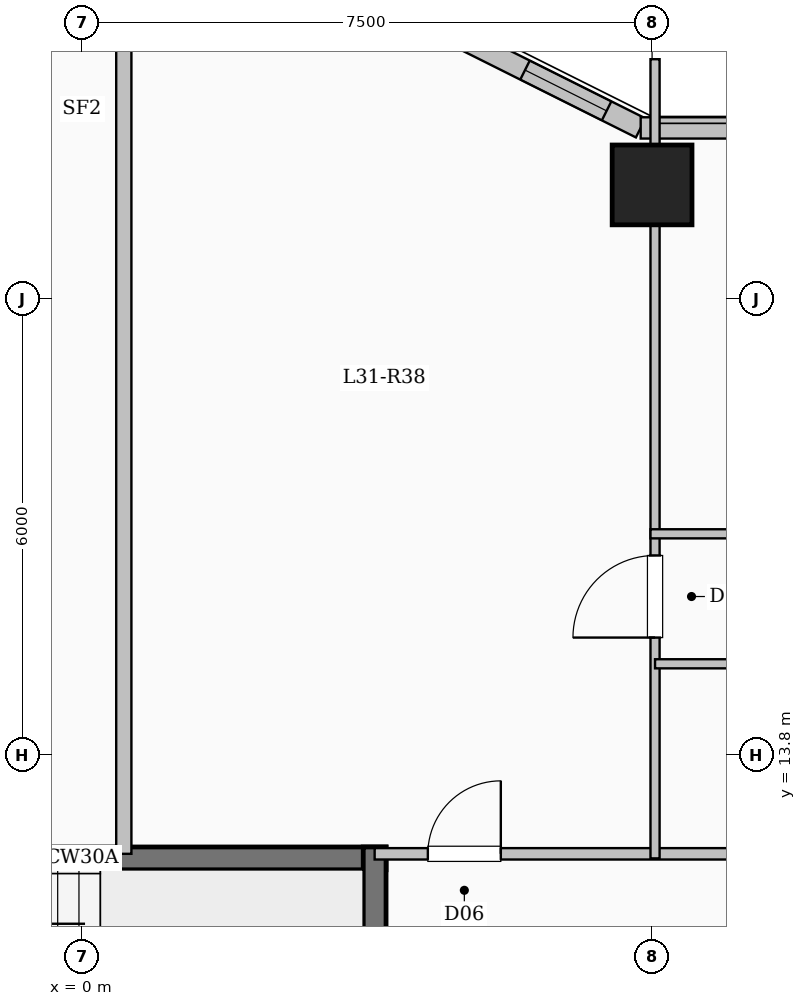
"""IFC4 building model, lengths in metres.
Left out: names, types, materials, properties, quantities, classifications, styles, units other than length and angle.
Written with IfcOpenShell. Run it as: python <this file> out.ifc"""

import sys

from ifc_helpers import new_model, si_unit, direction, frame, frame_2d, origin, origin_2d, place, context, subcontext, project, spatial, rectangle, extrude, element, fill, save


model = new_model("IFC4")
c1 = context("Model", 3, precision=1e-05, world=origin(), true_north=direction((0.0, 1.0)))
c2 = subcontext(c1, "Body", "Model", "MODEL_VIEW")
j1 = project(units=[si_unit("LENGTHUNIT", "METRE"), si_unit("PLANEANGLEUNIT", "RADIAN")], contexts=[c1])
p1 = place(None, origin())
s1 = spatial("IfcSite", under=j1, at=p1, CompositionType="ELEMENT")
p2 = place(p1, origin())
s2 = spatial("IfcBuilding", under=s1, at=p2, CompositionType="ELEMENT")
p3 = place(p2, frame((0.0, 0.0, 115.15)))
s3 = spatial("IfcBuildingStorey", under=s2, at=p3, CompositionType="ELEMENT", Elevation=115.15)
p4 = place(p3, frame((7.5, 21.3, 0.0), z_axis=(0.0, 0.0, 1.0), x_axis=(1.0, 0.0, 0.0)))
e1 = element("IfcColumn", 1, at=p4, inside=s3, PredefinedType="COLUMN", context=c2, shape_type="SweptSolid", body=[
    extrude(rectangle(XDim=1.05, YDim=1.05, at=origin_2d()), origin(), (0.0, 0.0, 1.0), 3.35),
])
p5 = place(p3, frame((4.35, 23.55, 0.0), z_axis=(0.0, 0.0, 1.0), x_axis=(0.894427191, -0.4472135955, 0.0)))
e2 = element("IfcWall", 2, at=p5, inside=s3, PredefinedType="SOLIDWALL", context=c2, shape_type="SweptSolid", body=[
    extrude(rectangle(XDim=3.354, YDim=0.28, at=frame_2d((1.677, 0.0))), origin(), (0.0, 0.0, 1.0), 3.05),
])
p6 = place(p5, frame((1.653, 0.0, 0.95)))
e3 = element("IfcOpeningElement", 3, at=p6, cuts=e2, PredefinedType="OPENING", context=c2, shape_type="SweptSolid", body=[
    extrude(rectangle(XDim=1.2, YDim=1.5, at=frame_2d((0.6, 0.75))), frame((0.0, 0.15, 0.0), z_axis=(0.0, -1.0, 0.0), x_axis=(1.0, 0.0, 0.0)), (0.0, 0.0, 1.0), 0.3),
])
p7 = place(p3, frame((7.35, 22.05, 0.0), z_axis=(0.0, 0.0, 1.0), x_axis=(1.0, 0.0, 0.0)))
e4 = element("IfcWall", 4, at=p7, inside=s3, PredefinedType="SOLIDWALL", context=c2, shape_type="SweptSolid", body=[
    extrude(rectangle(XDim=13.8, YDim=0.28, at=frame_2d((6.9, 0.0))), origin(), (0.0, 0.0, 1.0), 3.05),
])
p8 = place(p7, frame((1.534, 0.0, 0.9)))
e5 = element("IfcOpeningElement", 5, at=p8, cuts=e4, PredefinedType="OPENING", context=c2, shape_type="SweptSolid", body=[
    extrude(rectangle(XDim=1.8, YDim=1.65, at=frame_2d((0.9, 0.825))), frame((0.0, 0.15, 0.0), z_axis=(0.0, -1.0, 0.0), x_axis=(1.0, 0.0, 0.0)), (0.0, 0.0, 1.0), 0.3),
])
p9 = place(p7, frame((6.025, 0.0, 0.9)))
e6 = element("IfcOpeningElement", 6, at=p9, cuts=e4, PredefinedType="OPENING", context=c2, shape_type="SweptSolid", body=[
    extrude(rectangle(XDim=1.8, YDim=1.65, at=frame_2d((0.9, 0.825))), frame((0.0, 0.15, 0.0), z_axis=(0.0, -1.0, 0.0), x_axis=(1.0, 0.0, 0.0)), (0.0, 0.0, 1.0), 0.3),
])
p10 = place(p7, frame((10.542, 0.0, 0.9)))
e7 = element("IfcOpeningElement", 7, at=p10, cuts=e4, PredefinedType="OPENING", context=c2, shape_type="SweptSolid", body=[
    extrude(rectangle(XDim=1.8, YDim=1.65, at=frame_2d((0.9, 0.825))), frame((0.0, 0.15, 0.0), z_axis=(0.0, -1.0, 0.0), x_axis=(1.0, 0.0, 0.0)), (0.0, 0.0, 1.0), 0.3),
])
p11 = place(p3, frame((-4.0, 12.44, 0.0), z_axis=(0.0, 0.0, 1.0), x_axis=(1.0, 0.0, 0.0)))
e8 = element("IfcWall", 8, at=p11, inside=s3, PredefinedType="SHEAR", context=c2, shape_type="SweptSolid", body=[
    extrude(rectangle(XDim=8.0, YDim=0.3, at=frame_2d((4.0, 0.0))), origin(), (0.0, 0.0, 1.0), 3.35),
])
p12 = place(p3, frame((3.85, 9.0, 0.0), z_axis=(0.0, 0.0, 1.0), x_axis=(0.0, 1.0, 0.0)))
e9 = element("IfcWall", 9, at=p12, inside=s3, PredefinedType="SHEAR", context=c2, shape_type="SweptSolid", body=[
    extrude(rectangle(XDim=3.59, YDim=0.3, at=frame_2d((1.795, 0.0))), origin(), (0.0, 0.0, 1.0), 3.35),
])
p13 = place(p3, frame((3.85, 12.5, 0.0), z_axis=(0.0, 0.0, 1.0), x_axis=(1.0, 0.0, 0.0)))
e10 = element("IfcWall", 10, at=p13, inside=s3, PredefinedType="PARTITIONING", context=c2, shape_type="SweptSolid", body=[
    extrude(rectangle(XDim=17.2, YDim=0.15, at=frame_2d((8.6, 0.0))), origin(), (0.0, 0.0, 1.0), 3.05),
])
p14 = place(p13, frame((0.7, 0.0, 0.0)))
e11 = element("IfcOpeningElement", 11, at=p14, cuts=e10, PredefinedType="OPENING", context=c2, shape_type="SweptSolid", body=[
    extrude(rectangle(XDim=0.96, YDim=2.15, at=frame_2d((0.48, 1.075))), frame((0.0, 0.085, 0.0), z_axis=(0.0, -1.0, 0.0), x_axis=(1.0, 0.0, 0.0)), (0.0, 0.0, 1.0), 0.17),
])
p15 = place(p3, frame((0.55, 12.5, 0.0), z_axis=(0.0, 0.0, 1.0), x_axis=(0.0, 1.0, 0.0)))
e12 = element("IfcWall", 12, at=p15, inside=s3, PredefinedType="SOLIDWALL", context=c2, shape_type="SweptSolid", body=[
    extrude(rectangle(XDim=11.08, YDim=0.2, at=frame_2d((5.54, 0.0))), origin(), (0.0, 0.0, 1.0), 3.05),
])
p16 = place(p3, frame((7.539, 12.44, 0.0), z_axis=(0.0, 0.0, 1.0), x_axis=(0.0, 1.0, 0.0)))
e13 = element("IfcWall", 13, at=p16, inside=s3, PredefinedType="PARTITIONING", context=c2, shape_type="SweptSolid", body=[
    extrude(rectangle(XDim=10.514, YDim=0.12, at=frame_2d((5.257, 0.0))), origin(), (0.0, 0.0, 1.0), 2.385),
])
p17 = place(p16, frame((2.905, 0.0, 0.0)))
e14 = element("IfcOpeningElement", 14, at=p17, cuts=e13, PredefinedType="OPENING", context=c2, shape_type="SweptSolid", body=[
    extrude(rectangle(XDim=1.08, YDim=2.15, at=frame_2d((0.54, 1.075))), frame((0.0, 0.07, 0.0), z_axis=(0.0, -1.0, 0.0), x_axis=(1.0, 0.0, 0.0)), (0.0, 0.0, 1.0), 0.14),
])
p18 = place(p3, frame((7.539, 15.0, 0.0), z_axis=(0.0, 0.0, 1.0), x_axis=(1.0, 0.0, 0.0)))
e15 = element("IfcWall", 15, at=p18, inside=s3, PredefinedType="PARTITIONING", context=c2, shape_type="SweptSolid", body=[
    extrude(rectangle(XDim=7.129, YDim=0.12, at=frame_2d((3.564, 0.0))), origin(), (0.0, 0.0, 1.0), 3.05),
])
p19 = place(p18, frame((3.124, 0.0, 0.0)))
e16 = element("IfcOpeningElement", 16, at=p19, cuts=e15, PredefinedType="OPENING", context=c2, shape_type="SweptSolid", body=[
    extrude(rectangle(XDim=0.88, YDim=2.1, at=frame_2d((0.44, 1.05))), frame((0.0, 0.07, 0.0), z_axis=(0.0, -1.0, 0.0), x_axis=(1.0, 0.0, 0.0)), (0.0, 0.0, 1.0), 0.14),
])
p20 = place(p3, frame((7.479, 16.71, 0.0), z_axis=(0.0, 0.0, 1.0), x_axis=(1.0, 0.0, 0.0)))
e17 = element("IfcWall", 17, at=p20, inside=s3, PredefinedType="PARTITIONING", context=c2, shape_type="SweptSolid", body=[
    extrude(rectangle(XDim=13.631, YDim=0.12, at=frame_2d((6.815, 0.0))), origin(), (0.0, 0.0, 1.0), 3.05),
])
p21 = place(p20, frame((1.802, 0.0, 0.0)))
e18 = element("IfcOpeningElement", 18, at=p21, cuts=e17, PredefinedType="OPENING", context=c2, shape_type="SweptSolid", body=[
    extrude(rectangle(XDim=0.88, YDim=2.1, at=frame_2d((0.44, 1.05))), frame((0.0, 0.07, 0.0), z_axis=(0.0, -1.0, 0.0), x_axis=(1.0, 0.0, 0.0)), (0.0, 0.0, 1.0), 0.14),
])
p22 = place(p20, frame((6.286, 0.0, 0.0)))
e19 = element("IfcOpeningElement", 19, at=p22, cuts=e17, PredefinedType="OPENING", context=c2, shape_type="SweptSolid", body=[
    extrude(rectangle(XDim=0.88, YDim=2.1, at=frame_2d((0.44, 1.05))), frame((0.0, 0.07, 0.0), z_axis=(0.0, -1.0, 0.0), x_axis=(1.0, 0.0, 0.0)), (0.0, 0.0, 1.0), 0.14),
])
p23 = place(p20, frame((10.769, 0.0, 0.0)))
e20 = element("IfcOpeningElement", 20, at=p23, cuts=e17, PredefinedType="OPENING", context=c2, shape_type="SweptSolid", body=[
    extrude(rectangle(XDim=0.88, YDim=2.1, at=frame_2d((0.44, 1.05))), frame((0.0, 0.07, 0.0), z_axis=(0.0, -1.0, 0.0), x_axis=(1.0, 0.0, 0.0)), (0.0, 0.0, 1.0), 0.14),
])
p24 = place(p6, origin())
e21 = element("IfcWindow", 21, at=p24, inside=s3, PartitioningType="SINGLE_PANEL", PredefinedType="WINDOW", context=c2, shape_type="SweptSolid", body=[
    extrude(rectangle(XDim=1.2, YDim=1.5, at=frame_2d((0.6, 0.75))), frame((0.0, 0.03, 0.0), z_axis=(0.0, -1.0, 0.0), x_axis=(1.0, 0.0, 0.0)), (0.0, 0.0, 1.0), 0.06),
])
fill(e3, e21)
p25 = place(p14, origin())
e22 = element("IfcDoor", 22, at=p25, inside=s3, OperationType="SINGLE_SWING_RIGHT", PredefinedType="DOOR", context=c2, shape_type="SweptSolid", body=[
    extrude(rectangle(XDim=0.96, YDim=2.15, at=frame_2d((0.48, 1.075))), frame((0.0, 0.025, 0.0), z_axis=(0.0, -1.0, 0.0), x_axis=(1.0, 0.0, 0.0)), (0.0, 0.0, 1.0), 0.05),
])
fill(e11, e22)
p26 = place(p17, origin())
e23 = element("IfcDoor", 23, at=p26, inside=s3, OperationType="SINGLE_SWING_LEFT", PredefinedType="DOOR", context=c2, shape_type="SweptSolid", body=[
    extrude(rectangle(XDim=1.08, YDim=2.15, at=frame_2d((0.54, 1.075))), frame((0.0, 0.025, 0.0), z_axis=(0.0, -1.0, 0.0), x_axis=(1.0, 0.0, 0.0)), (0.0, 0.0, 1.0), 0.05),
])
fill(e14, e23)
save(model, sys.argv[1])
